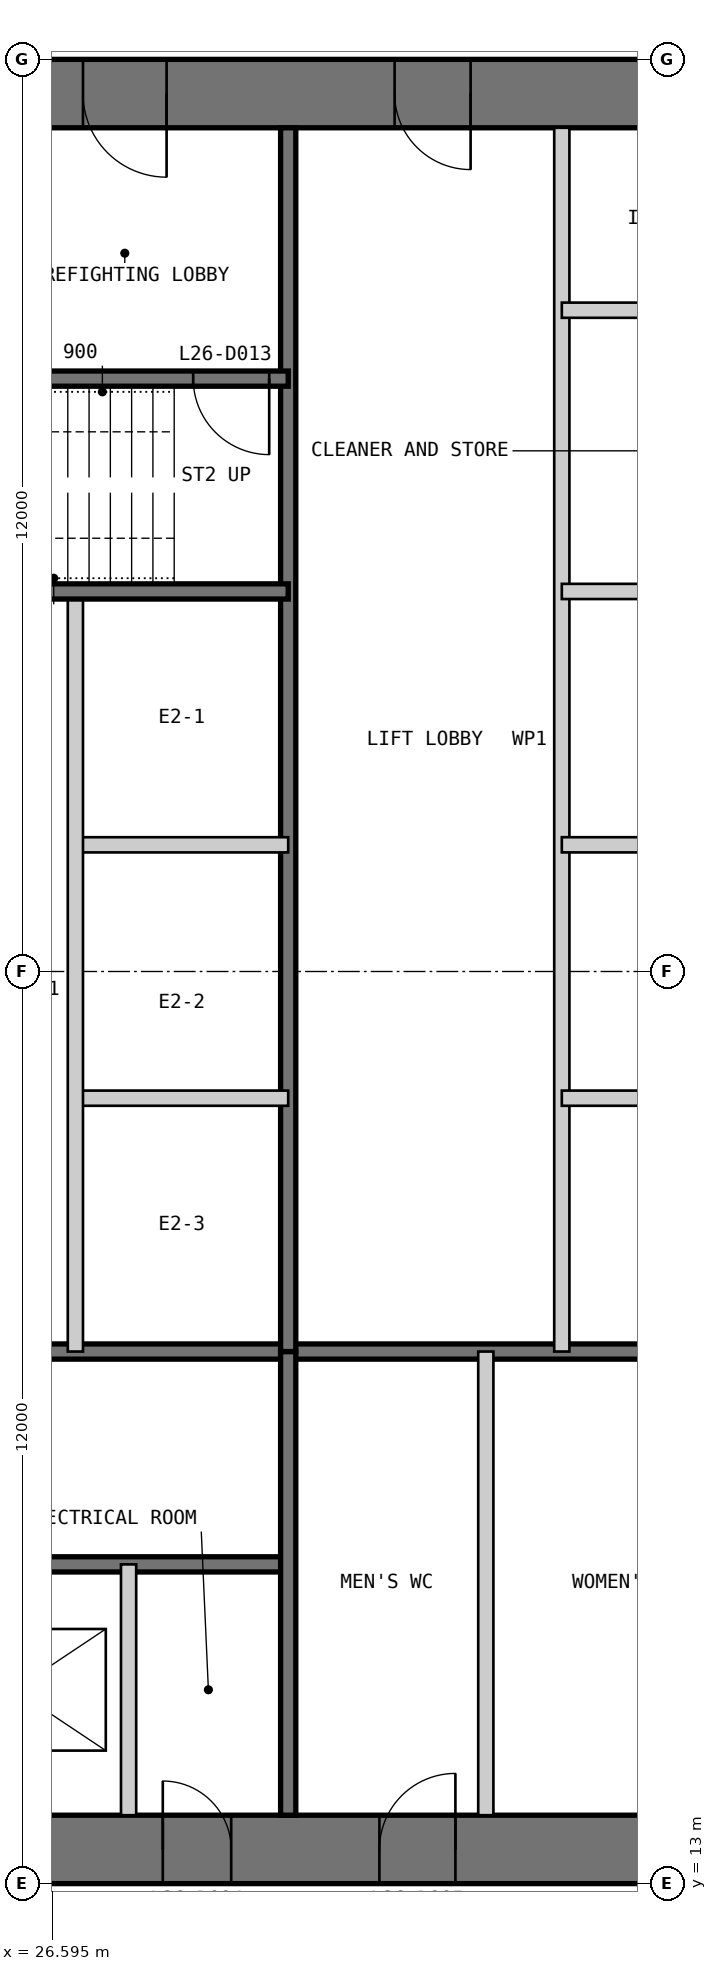
"""IFC4 building model, lengths in metres.
Left out: names, types, materials, properties, quantities, classifications, styles, units other than length and angle.
Written with IfcOpenShell. Run it as: python <this file> out.ifc"""

import sys

from ifc_helpers import new_model, si_unit, direction, frame, frame_2d, origin, place, context, subcontext, project, spatial, polyline, rectangle, outline, extrude, element, fill, save


model = new_model("IFC4")
c1 = context("Model", 3, precision=1e-05, world=origin(), true_north=direction((0.0, 1.0)))
c2 = subcontext(c1, "Body", "Model", "MODEL_VIEW")
j1 = project(units=[si_unit("LENGTHUNIT", "METRE"), si_unit("PLANEANGLEUNIT", "RADIAN")], contexts=[c1])
p1 = place(None, origin())
s1 = spatial("IfcSite", under=j1, at=p1, CompositionType="ELEMENT")
p2 = place(p1, origin())
s2 = spatial("IfcBuilding", under=s1, at=p2, CompositionType="ELEMENT")
p3 = place(p2, frame((0.0, 0.0, 114.4)))
s3 = spatial("IfcBuildingStorey", under=s2, at=p3, CompositionType="ELEMENT", Elevation=114.4)
p4 = place(p3, frame((13.0, 13.45, 0.0), z_axis=(0.0, 0.0, 1.0), x_axis=(1.0, 0.0, 0.0)))
e1 = element("IfcWall", 1, at=p4, inside=s3, PredefinedType="SHEAR", context=c2, shape_type="SweptSolid", body=[
    extrude(outline(polyline([(0.0, -0.45), (24.0, -0.45), (23.1, 0.45), (0.9, 0.45), (0.0, -0.45)])), origin(), (0.0, 0.0, 1.0), 4.0),
])
p5 = place(p4, frame((4.9, 0.0, 0.0)))
e2 = element("IfcOpeningElement", 2, at=p5, cuts=e1, PredefinedType="OPENING", context=c2, shape_type="SweptSolid", body=[
    extrude(rectangle(XDim=1.0, YDim=2.2, at=frame_2d((0.5, 1.1))), frame((0.0, 0.46, 0.0), z_axis=(0.0, -1.0, 0.0), x_axis=(1.0, 0.0, 0.0)), (0.0, 0.0, 1.0), 0.92),
])
p6 = place(p4, frame((8.9, 0.0, 0.0)))
e3 = element("IfcOpeningElement", 3, at=p6, cuts=e1, PredefinedType="OPENING", context=c2, shape_type="SweptSolid", body=[
    extrude(rectangle(XDim=1.1, YDim=2.2, at=frame_2d((0.55, 1.1))), frame((0.0, 0.46, 0.0), z_axis=(0.0, -1.0, 0.0), x_axis=(1.0, 0.0, 0.0)), (0.0, 0.0, 1.0), 0.92),
])
p7 = place(p4, frame((15.05, 0.0, 0.0)))
e4 = element("IfcOpeningElement", 4, at=p7, cuts=e1, PredefinedType="OPENING", context=c2, shape_type="SweptSolid", body=[
    extrude(rectangle(XDim=0.9, YDim=2.2, at=frame_2d((0.45, 1.1))), frame((0.0, 0.46, 0.0), z_axis=(0.0, -1.0, 0.0), x_axis=(1.0, 0.0, 0.0)), (0.0, 0.0, 1.0), 0.92),
])
p8 = place(p4, frame((17.9, 0.0, 0.0)))
e5 = element("IfcOpeningElement", 5, at=p8, cuts=e1, PredefinedType="OPENING", context=c2, shape_type="SweptSolid", body=[
    extrude(rectangle(XDim=1.0, YDim=2.2, at=frame_2d((0.5, 1.1))), frame((0.0, 0.46, 0.0), z_axis=(0.0, -1.0, 0.0), x_axis=(1.0, 0.0, 0.0)), (0.0, 0.0, 1.0), 0.92),
])
p9 = place(p4, frame((21.4, 0.0, 0.0)))
e6 = element("IfcOpeningElement", 6, at=p9, cuts=e1, PredefinedType="OPENING", context=c2, shape_type="SweptSolid", body=[
    extrude(rectangle(XDim=1.0, YDim=2.2, at=frame_2d((0.5, 1.1))), frame((0.0, 0.46, 0.0), z_axis=(0.0, -1.0, 0.0), x_axis=(1.0, 0.0, 0.0)), (0.0, 0.0, 1.0), 0.92),
])
p10 = place(p3, frame((37.0, 36.55, 0.0), z_axis=(0.0, 0.0, 1.0), x_axis=(-1.0, 0.0, 0.0)))
e7 = element("IfcWall", 7, at=p10, inside=s3, PredefinedType="SHEAR", context=c2, shape_type="SweptSolid", body=[
    extrude(outline(polyline([(0.0, -0.45), (24.0, -0.45), (23.1, 0.45), (0.9, 0.45), (0.0, -0.45)])), origin(), (0.0, 0.0, 1.0), 4.0),
])
p11 = place(p10, frame((4.9, 0.0, 0.0)))
e8 = element("IfcOpeningElement", 8, at=p11, cuts=e7, PredefinedType="OPENING", context=c2, shape_type="SweptSolid", body=[
    extrude(rectangle(XDim=1.0, YDim=2.2, at=frame_2d((0.5, 1.1))), frame((0.0, 0.46, 0.0), z_axis=(0.0, -1.0, 0.0), x_axis=(1.0, 0.0, 0.0)), (0.0, 0.0, 1.0), 0.92),
])
p12 = place(p10, frame((8.9, 0.0, 0.0)))
e9 = element("IfcOpeningElement", 9, at=p12, cuts=e7, PredefinedType="OPENING", context=c2, shape_type="SweptSolid", body=[
    extrude(rectangle(XDim=1.1, YDim=2.2, at=frame_2d((0.55, 1.1))), frame((0.0, 0.46, 0.0), z_axis=(0.0, -1.0, 0.0), x_axis=(1.0, 0.0, 0.0)), (0.0, 0.0, 1.0), 0.92),
])
p13 = place(p10, frame((15.05, 0.0, 0.0)))
e10 = element("IfcOpeningElement", 10, at=p13, cuts=e7, PredefinedType="OPENING", context=c2, shape_type="SweptSolid", body=[
    extrude(rectangle(XDim=0.9, YDim=2.2, at=frame_2d((0.45, 1.1))), frame((0.0, 0.46, 0.0), z_axis=(0.0, -1.0, 0.0), x_axis=(1.0, 0.0, 0.0)), (0.0, 0.0, 1.0), 0.92),
])
p14 = place(p10, frame((17.9, 0.0, 0.0)))
e11 = element("IfcOpeningElement", 11, at=p14, cuts=e7, PredefinedType="OPENING", context=c2, shape_type="SweptSolid", body=[
    extrude(rectangle(XDim=1.0, YDim=2.2, at=frame_2d((0.5, 1.1))), frame((0.0, 0.46, 0.0), z_axis=(0.0, -1.0, 0.0), x_axis=(1.0, 0.0, 0.0)), (0.0, 0.0, 1.0), 0.92),
])
p15 = place(p10, frame((21.4, 0.0, 0.0)))
e12 = element("IfcOpeningElement", 12, at=p15, cuts=e7, PredefinedType="OPENING", context=c2, shape_type="SweptSolid", body=[
    extrude(rectangle(XDim=1.0, YDim=2.2, at=frame_2d((0.5, 1.1))), frame((0.0, 0.46, 0.0), z_axis=(0.0, -1.0, 0.0), x_axis=(1.0, 0.0, 0.0)), (0.0, 0.0, 1.0), 0.92),
])
p16 = place(p3, frame((20.3, 17.2, 0.0), z_axis=(0.0, 0.0, 1.0), x_axis=(1.0, 0.0, 0.0)))
e13 = element("IfcWall", 13, at=p16, inside=s3, PredefinedType="SOLIDWALL", context=c2, shape_type="SweptSolid", body=[
    extrude(rectangle(XDim=9.4, YDim=0.2, at=frame_2d((4.7, 0.0))), origin(), (0.0, 0.0, 1.0), 3.8),
])
p17 = place(p16, frame((0.25, 0.0, 0.0)))
e14 = element("IfcOpeningElement", 14, at=p17, cuts=e13, PredefinedType="OPENING", context=c2, shape_type="SweptSolid", body=[
    extrude(rectangle(XDim=1.0, YDim=2.2, at=frame_2d((0.5, 1.1))), frame((0.0, 0.11, 0.0), z_axis=(0.0, -1.0, 0.0), x_axis=(1.0, 0.0, 0.0)), (0.0, 0.0, 1.0), 0.22),
])
p18 = place(p3, frame((20.3, 20.0, 0.0), z_axis=(0.0, 0.0, 1.0), x_axis=(1.0, 0.0, 0.0)))
e15 = element("IfcWall", 15, at=p18, inside=s3, PredefinedType="SOLIDWALL", context=c2, shape_type="SweptSolid", body=[
    extrude(rectangle(XDim=15.8, YDim=0.2, at=frame_2d((7.9, 0.0))), origin(), (0.0, 0.0, 1.0), 3.8),
])
p19 = place(p3, frame((27.6, 13.9, 0.0), z_axis=(0.0, 0.0, 1.0), x_axis=(0.0, 1.0, 0.0)))
e16 = element("IfcWall", 16, at=p19, inside=s3, PredefinedType="PARTITIONING", context=c2, shape_type="SweptSolid", body=[
    extrude(rectangle(XDim=3.3, YDim=0.2, at=frame_2d((1.65, 0.0))), origin(), (0.0, 0.0, 1.0), 3.8),
])
p20 = place(p3, frame((29.7, 13.9, 0.0), z_axis=(0.0, 0.0, 1.0), x_axis=(0.0, 1.0, 0.0)))
e17 = element("IfcWall", 17, at=p20, inside=s3, PredefinedType="SOLIDWALL", context=c2, shape_type="SweptSolid", body=[
    extrude(rectangle(XDim=6.1, YDim=0.2, at=frame_2d((3.05, 0.0))), origin(), (0.0, 0.0, 1.0), 3.8),
])
p21 = place(p3, frame((32.3, 13.9, 0.0), z_axis=(0.0, 0.0, 1.0), x_axis=(0.0, 1.0, 0.0)))
e18 = element("IfcWall", 18, at=p21, inside=s3, PredefinedType="PARTITIONING", context=c2, shape_type="SweptSolid", body=[
    extrude(rectangle(XDim=6.1, YDim=0.2, at=frame_2d((3.05, 0.0))), origin(), (0.0, 0.0, 1.0), 3.8),
])
p22 = place(p3, frame((33.3, 36.1, 0.0), z_axis=(0.0, 0.0, 1.0), x_axis=(0.0, -1.0, 0.0)))
e19 = element("IfcWall", 19, at=p22, inside=s3, PredefinedType="PARTITIONING", context=c2, shape_type="SweptSolid", body=[
    extrude(rectangle(XDim=16.1, YDim=0.2, at=frame_2d((8.05, 0.0))), origin(), (0.0, 0.0, 1.0), 3.8),
])
p23 = place(p3, frame((29.7, 36.1, 0.0), z_axis=(0.0, 0.0, 1.0), x_axis=(0.0, -1.0, 0.0)))
e20 = element("IfcWall", 20, at=p23, inside=s3, PredefinedType="SOLIDWALL", context=c2, shape_type="SweptSolid", body=[
    extrude(rectangle(XDim=16.1, YDim=0.2, at=frame_2d((8.05, 0.0))), origin(), (0.0, 0.0, 1.0), 3.8),
])
for number, where, z_axis, x_axis in (
    (21, (36.1, 30.0, 0.0), (0.0, 0.0, 1.0), (-1.0, 0.0, 0.0)),
    (22, (36.1, 26.667, 0.0), (0.0, 0.0, 1.0), (-1.0, 0.0, 0.0)),
    (23, (36.1, 23.333, 0.0), (0.0, 0.0, 1.0), (-1.0, 0.0, 0.0)),
    (24, (29.7, 26.667, 0.0), (0.0, 0.0, 1.0), (-1.0, 0.0, 0.0)),
    (25, (29.7, 23.333, 0.0), (0.0, 0.0, 1.0), (-1.0, 0.0, 0.0)),
):
    element("IfcWall", number, at=place(p3, frame(where, z_axis=z_axis, x_axis=x_axis)), inside=s3, PredefinedType="PARTITIONING", context=c2, shape_type="SweptSolid", body=[
        extrude(rectangle(XDim=2.8, YDim=0.2, at=frame_2d((1.4, 0.0))), origin(), (0.0, 0.0, 1.0), 3.8),
    ])
p24 = place(p3, frame((26.9, 30.0, 0.0), z_axis=(0.0, 0.0, 1.0), x_axis=(0.0, -1.0, 0.0)))
e26 = element("IfcWall", 26, at=p24, inside=s3, PredefinedType="PARTITIONING", context=c2, shape_type="SweptSolid", body=[
    extrude(rectangle(XDim=10.0, YDim=0.2, at=frame_2d((5.0, 0.0))), origin(), (0.0, 0.0, 1.0), 3.8),
])
p25 = place(p3, frame((29.7, 32.8, 0.0), z_axis=(0.0, 0.0, 1.0), x_axis=(-1.0, 0.0, 0.0)))
e27 = element("IfcWall", 27, at=p25, inside=s3, PredefinedType="SOLIDWALL", context=c2, shape_type="SweptSolid", body=[
    extrude(rectangle(XDim=9.4, YDim=0.2, at=frame_2d((4.7, 0.0))), origin(), (0.0, 0.0, 1.0), 3.8),
])
p26 = place(p25, frame((0.25, 0.0, 0.0)))
e28 = element("IfcOpeningElement", 28, at=p26, cuts=e27, PredefinedType="OPENING", context=c2, shape_type="SweptSolid", body=[
    extrude(rectangle(XDim=1.0, YDim=2.2, at=frame_2d((0.5, 1.1))), frame((0.0, 0.11, 0.0), z_axis=(0.0, -1.0, 0.0), x_axis=(1.0, 0.0, 0.0)), (0.0, 0.0, 1.0), 0.22),
])
p27 = place(p3, frame((29.7, 30.0, 0.0), z_axis=(0.0, 0.0, 1.0), x_axis=(-1.0, 0.0, 0.0)))
e29 = element("IfcWall", 29, at=p27, inside=s3, PredefinedType="SOLIDWALL", context=c2, shape_type="SweptSolid", body=[
    extrude(rectangle(XDim=15.8, YDim=0.2, at=frame_2d((7.9, 0.0))), origin(), (0.0, 0.0, 1.0), 3.8),
])
p28 = place(p3, frame((36.1, 33.7, 0.0), z_axis=(0.0, 0.0, 1.0), x_axis=(-1.0, 0.0, 0.0)))
e30 = element("IfcWall", 30, at=p28, inside=s3, PredefinedType="PARTITIONING", context=c2, shape_type="SweptSolid", body=[
    extrude(rectangle(XDim=2.8, YDim=0.2, at=frame_2d((1.4, 0.0))), origin(), (0.0, 0.0, 1.0), 3.8),
])
p29 = place(p7, origin())
e31 = element("IfcDoor", 31, at=p29, inside=s3, OperationType="SINGLE_SWING_LEFT", PredefinedType="DOOR", context=c2, shape_type="SweptSolid", body=[
    extrude(rectangle(XDim=0.9, YDim=2.2, at=frame_2d((0.45, 1.1))), frame((0.0, 0.025, 0.0), z_axis=(0.0, -1.0, 0.0), x_axis=(1.0, 0.0, 0.0)), (0.0, 0.0, 1.0), 0.05),
    extrude(outline(polyline([(0.0, 0.0), (0.04, 0.0), (0.04, 2.16), (0.86, 2.16), (0.86, 0.0), (0.9, 0.0), (0.9, 2.2), (0.0, 2.2), (0.0, 0.0)])), frame((0.0, 0.3, 0.0), z_axis=(0.0, -1.0, 0.0), x_axis=(1.0, 0.0, 0.0)), (0.0, 0.0, 1.0), 0.6),
])
fill(e4, e31)
p30 = place(p8, origin())
e32 = element("IfcDoor", 32, at=p30, inside=s3, OperationType="SINGLE_SWING_RIGHT", PredefinedType="DOOR", context=c2, shape_type="SweptSolid", body=[
    extrude(rectangle(XDim=1.0, YDim=2.2, at=frame_2d((0.5, 1.1))), frame((0.0, 0.025, 0.0), z_axis=(0.0, -1.0, 0.0), x_axis=(1.0, 0.0, 0.0)), (0.0, 0.0, 1.0), 0.05),
    extrude(outline(polyline([(0.0, 0.0), (0.04, 0.0), (0.04, 2.16), (0.96, 2.16), (0.96, 0.0), (1.0, 0.0), (1.0, 2.2), (0.0, 2.2), (0.0, 0.0)])), frame((0.0, 0.3, 0.0), z_axis=(0.0, -1.0, 0.0), x_axis=(1.0, 0.0, 0.0)), (0.0, 0.0, 1.0), 0.6),
])
fill(e5, e32)
p31 = place(p11, origin())
e33 = element("IfcDoor", 33, at=p31, inside=s3, OperationType="SINGLE_SWING_LEFT", PredefinedType="DOOR", context=c2, shape_type="SweptSolid", body=[
    extrude(rectangle(XDim=1.0, YDim=2.2, at=frame_2d((0.5, 1.1))), frame((0.0, 0.025, 0.0), z_axis=(0.0, -1.0, 0.0), x_axis=(1.0, 0.0, 0.0)), (0.0, 0.0, 1.0), 0.05),
    extrude(outline(polyline([(0.0, 0.0), (0.04, 0.0), (0.04, 2.16), (0.96, 2.16), (0.96, 0.0), (1.0, 0.0), (1.0, 2.2), (0.0, 2.2), (0.0, 0.0)])), frame((0.0, 0.3, 0.0), z_axis=(0.0, -1.0, 0.0), x_axis=(1.0, 0.0, 0.0)), (0.0, 0.0, 1.0), 0.6),
])
fill(e8, e33)
p32 = place(p12, origin())
e34 = element("IfcDoor", 34, at=p32, inside=s3, OperationType="SINGLE_SWING_LEFT", PredefinedType="DOOR", context=c2, shape_type="SweptSolid", body=[
    extrude(rectangle(XDim=1.1, YDim=2.2, at=frame_2d((0.55, 1.1))), frame((0.0, 0.025, 0.0), z_axis=(0.0, -1.0, 0.0), x_axis=(1.0, 0.0, 0.0)), (0.0, 0.0, 1.0), 0.05),
    extrude(outline(polyline([(0.0, 0.0), (0.04, 0.0), (0.04, 2.16), (1.06, 2.16), (1.06, 0.0), (1.1, 0.0), (1.1, 2.2), (0.0, 2.2), (0.0, 0.0)])), frame((0.0, 0.3, 0.0), z_axis=(0.0, -1.0, 0.0), x_axis=(1.0, 0.0, 0.0)), (0.0, 0.0, 1.0), 0.6),
])
fill(e9, e34)
p33 = place(p26, origin())
e35 = element("IfcDoor", 35, at=p33, inside=s3, OperationType="SINGLE_SWING_LEFT", PredefinedType="DOOR", context=c2, shape_type="SweptSolid", body=[
    extrude(rectangle(XDim=1.0, YDim=2.2, at=frame_2d((0.5, 1.1))), frame((0.0, 0.025, 0.0), z_axis=(0.0, -1.0, 0.0), x_axis=(1.0, 0.0, 0.0)), (0.0, 0.0, 1.0), 0.05),
])
fill(e28, e35)
save(model, sys.argv[1])
